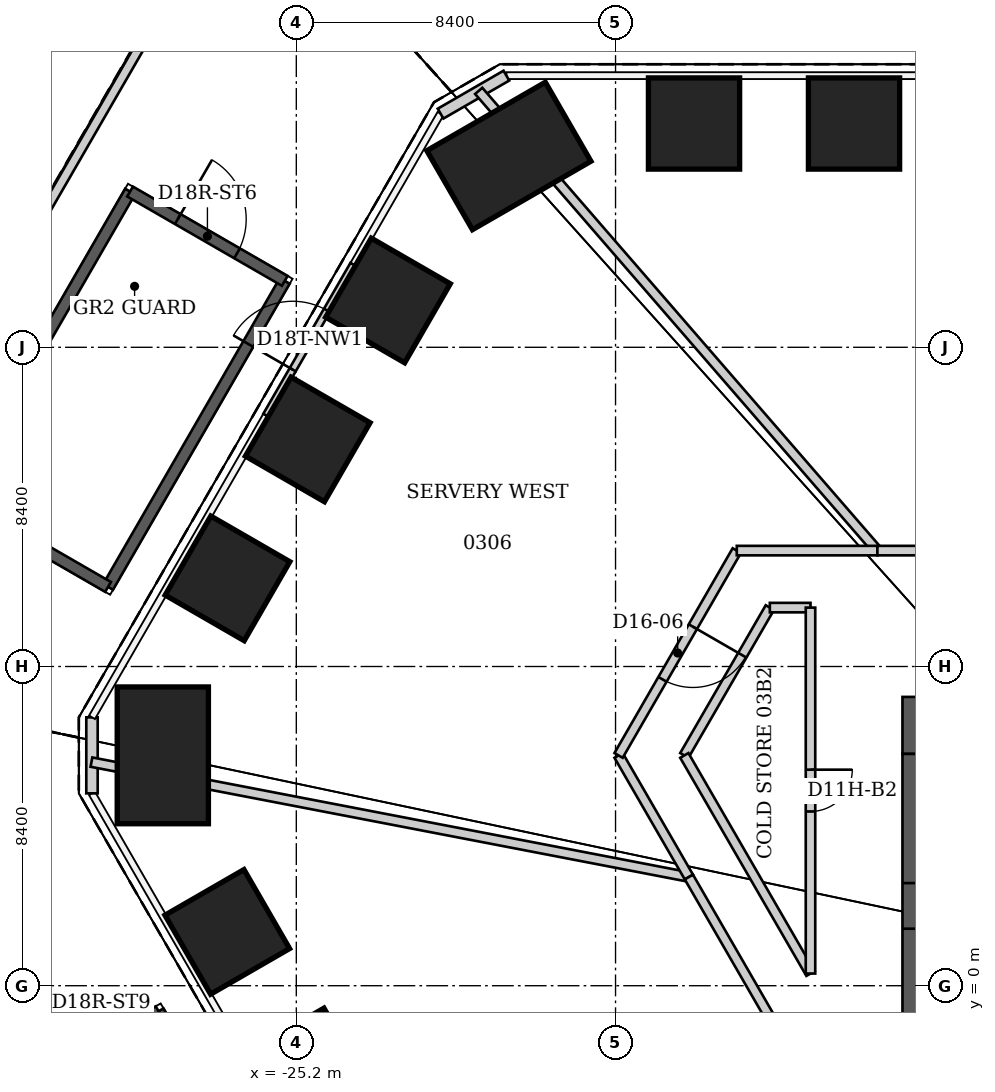
"""IFC4 building model, lengths in metres.
Left out: names, types, materials, properties, quantities, classifications, styles, units other than length and angle.
Written with IfcOpenShell. Run it as: python <this file> out.ifc"""

import sys

from ifc_helpers import new_model, si_unit, direction, frame, frame_2d, origin, origin_2d, place, context, subcontext, project, spatial, rectangle, extrude, element, fill, save


model = new_model("IFC4")
c1 = context("Model", 3, precision=1e-05, world=origin(), true_north=direction((0.0, 1.0)))
c2 = subcontext(c1, "Body", "Model", "MODEL_VIEW")
j1 = project(units=[si_unit("LENGTHUNIT", "METRE"), si_unit("PLANEANGLEUNIT", "RADIAN")], contexts=[c1])
p1 = place(None, origin())
s1 = spatial("IfcSite", under=j1, at=p1, CompositionType="ELEMENT")
p2 = place(p1, origin())
s2 = spatial("IfcBuilding", under=s1, at=p2, CompositionType="ELEMENT")
p3 = place(p2, frame((0.0, 0.0, 18.0)))
s3 = spatial("IfcBuildingStorey", under=s2, at=p3, CompositionType="ELEMENT", Elevation=18.0)
for number, where, z_axis, x_axis in (
    (1, (-14.735, 22.689, 0.0), (0.0, 0.0, 1.0), (0.0, 1.0, 0.0)),
    (2, (-10.525, 22.689, 0.0), (0.0, 0.0, 1.0), (0.0, 1.0, 0.0)),
    (3, (-24.911, -2.23, 0.0), (0.0, 0.0, 1.0), (-0.866, -0.5, 0.0)),
    (4, (-27.016, 1.416, 0.0), (0.0, 0.0, 1.0), (-0.866, -0.5, 0.0)),
):
    element("IfcColumn", number, at=place(p3, frame(where, z_axis=z_axis, x_axis=x_axis)), inside=s3, PredefinedType="COLUMN", context=c2, shape_type="SweptSolid", body=[
        extrude(rectangle(XDim=2.4, YDim=2.4, at=origin_2d()), origin(), (0.0, 0.0, 1.0), 5.0),
    ])
p4 = place(p3, frame((-28.713, 6.062, 0.0), z_axis=(0.0, 0.0, 1.0), x_axis=(-1.0, 0.0, 0.0)))
e5 = element("IfcColumn", 5, at=p4, inside=s3, PredefinedType="COLUMN", context=c2, shape_type="SweptSolid", body=[
    extrude(rectangle(XDim=2.4, YDim=3.6, at=origin_2d()), origin(), (0.0, 0.0, 1.0), 5.0),
])
for number, where, z_axis, x_axis in (
    (6, (-27.01, 10.719, 0.0), (0.0, 0.0, 1.0), (-0.866, 0.5, 0.0)),
    (7, (-24.899, 14.375, 0.0), (0.0, 0.0, 1.0), (-0.866, 0.5, 0.0)),
    (8, (-22.788, 18.032, 0.0), (0.0, 0.0, 1.0), (-0.866, 0.5, 0.0)),
):
    element("IfcColumn", number, at=place(p3, frame(where, z_axis=z_axis, x_axis=x_axis)), inside=s3, PredefinedType="COLUMN", context=c2, shape_type="SweptSolid", body=[
        extrude(rectangle(XDim=2.4, YDim=2.4, at=origin_2d()), origin(), (0.0, 0.0, 1.0), 5.0),
    ])
p5 = place(p3, frame((-19.606, 21.835, 0.0), z_axis=(0.0, 0.0, 1.0), x_axis=(-0.5, 0.866025403784, 0.0)))
e9 = element("IfcColumn", 9, at=p5, inside=s3, PredefinedType="COLUMN", context=c2, shape_type="SweptSolid", body=[
    extrude(rectangle(XDim=2.4, YDim=3.6, at=origin_2d()), origin(), (0.0, 0.0, 1.0), 5.0),
])
p6 = place(p3, frame((-9.25, 6.85, 0.0), z_axis=(0.0, 0.0, 1.0), x_axis=(1.0, 0.0, 0.0)))
e10 = element("IfcWall", 10, at=p6, inside=s3, PredefinedType="SHEAR", context=c2, shape_type="SweptSolid", body=[
    extrude(rectangle(XDim=18.5, YDim=1.5, at=frame_2d((9.25, 0.0))), origin(), (0.0, 0.0, 1.0), 5.0),
])
p7 = place(p3, frame((-8.5, -9.2, 0.0), z_axis=(0.0, 0.0, 1.0), x_axis=(0.0, 1.0, 0.0)))
e11 = element("IfcWall", 11, at=p7, inside=s3, PredefinedType="SHEAR", context=c2, shape_type="SweptSolid", body=[
    extrude(rectangle(XDim=15.3, YDim=1.5, at=frame_2d((7.65, 0.0))), origin(), (0.0, 0.0, 1.0), 5.0),
])
p8 = place(p7, frame((10.7, 0.0, 0.0)))
e12 = element("IfcOpeningElement", 12, at=p8, cuts=e11, PredefinedType="OPENING", context=c2, shape_type="SweptSolid", body=[
    extrude(rectangle(XDim=1.2, YDim=2.2, at=frame_2d((0.6, 1.1))), frame((0.0, 0.75, 0.0), z_axis=(0.0, -1.0, 0.0), x_axis=(1.0, 0.0, 0.0)), (0.0, 0.0, 1.0), 1.5),
])
p9 = place(p3, frame((-30.576, 5.062, 0.0), z_axis=(0.0, 0.0, 1.0), x_axis=(0.0, 1.0, 0.0)))
e13 = element("IfcWall", 13, at=p9, inside=s3, PredefinedType="SOLIDWALL", context=c2, shape_type="SweptSolid", body=[
    extrude(rectangle(XDim=2.0, YDim=0.3, at=frame_2d((1.0, 0.0))), origin(), (0.0, 0.0, 1.0), 4.84),
])
p10 = place(p3, frame((-25.99, 15.005, 0.0), z_axis=(0.0, 0.0, 1.0), x_axis=(0.499986657325, 0.866033107044, 0.0)))
e14 = element("IfcWall", 14, at=p10, inside=s3, PredefinedType="SOLIDWALL", context=c2, shape_type="SweptSolid", body=[
    extrude(rectangle(XDim=4.586, YDim=0.18, at=frame_2d((2.293, 0.0))), origin(), (0.0, 0.0, 1.0), 4.84),
])
p11 = place(p10, frame((1.393, 0.0, 0.0)))
e15 = element("IfcOpeningElement", 15, at=p11, cuts=e14, PredefinedType="OPENING", context=c2, shape_type="SweptSolid", body=[
    extrude(rectangle(XDim=1.8, YDim=2.4, at=frame_2d((0.9, 1.2))), frame((0.0, 0.09, 0.0), z_axis=(0.0, -1.0, 0.0), x_axis=(1.0, 0.0, 0.0)), (0.0, 0.0, 1.0), 0.18),
])
p12 = place(p3, frame((-21.404, 22.949, 0.0), z_axis=(0.0, 0.0, 1.0), x_axis=(0.866010750942, 0.50002537861, 0.0)))
e16 = element("IfcWall", 16, at=p12, inside=s3, PredefinedType="SOLIDWALL", context=c2, shape_type="SweptSolid", body=[
    extrude(rectangle(XDim=2.0, YDim=0.3, at=frame_2d((1.0, 0.0))), origin(), (0.0, 0.0, 1.0), 4.84),
])
p13 = place(p3, frame((-26.87, 28.951, -0.15), z_axis=(0.0, 0.0, 1.0), x_axis=(-0.50000302432, -0.866023657685, 0.0)))
e17 = element("IfcWall", 17, at=p13, inside=s3, PredefinedType="PARAPET", context=c2, shape_type="SweptSolid", body=[
    extrude(rectangle(XDim=23.275, YDim=0.25, at=frame_2d((11.637, 0.0))), origin(), (0.0, 0.0, 1.0), 1.25),
])
p14 = place(p3, frame((-38.505, 6.303, -0.15), z_axis=(0.0, 0.0, 1.0), x_axis=(0.500000964025, -0.866024847203, 0.0)))
e18 = element("IfcWall", 18, at=p14, inside=s3, PredefinedType="PARAPET", context=c2, shape_type="SweptSolid", body=[
    extrude(rectangle(XDim=49.423, YDim=0.25, at=frame_2d((24.712, 0.0))), origin(), (0.0, 0.0, 1.0), 1.25),
])
p15 = place(p3, frame((-30.591, 5.884, 0.0), z_axis=(0.0, 0.0, 1.0), x_axis=(0.981994806005, -0.188907916665, 0.0)))
e19 = element("IfcWall", 19, at=p15, inside=s3, PredefinedType="PARTITIONING", context=c2, shape_type="SweptSolid", body=[
    extrude(rectangle(XDim=16.009, YDim=0.25, at=frame_2d((8.004, 0.0))), origin(), (0.0, 0.0, 1.0), 4.84),
])
p16 = place(p3, frame((-16.72, 6.06, 0.0), z_axis=(0.0, 0.0, 1.0), x_axis=(0.500499855385, -0.86573661974, 0.0)))
e20 = element("IfcWall", 20, at=p16, inside=s3, PredefinedType="PARTITIONING", context=c2, shape_type="SweptSolid", body=[
    extrude(rectangle(XDim=3.697, YDim=0.25, at=frame_2d((1.848, 0.0))), origin(), (0.0, 0.0, 1.0), 4.84),
])
p17 = place(p3, frame((-14.99, 6.06, 0.0), z_axis=(0.0, 0.0, 1.0), x_axis=(0.50069571766, 0.865623358232, 0.0)))
e21 = element("IfcWall", 21, at=p17, inside=s3, PredefinedType="PARTITIONING", context=c2, shape_type="SweptSolid", body=[
    extrude(rectangle(XDim=4.494, YDim=0.25, at=frame_2d((2.247, 0.0))), origin(), (0.0, 0.0, 1.0), 4.84),
])
p18 = place(p3, frame((-14.87, 2.86, 0.0), z_axis=(0.0, 0.0, 1.0), x_axis=(0.500193675883, -0.865913556082, 0.0)))
e22 = element("IfcWall", 22, at=p18, inside=s3, PredefinedType="PARTITIONING", context=c2, shape_type="SweptSolid", body=[
    extrude(rectangle(XDim=6.398, YDim=0.25, at=frame_2d((3.199, 0.0))), origin(), (0.0, 0.0, 1.0), 4.84),
])
p19 = place(p3, frame((-13.61, 11.45, 0.0), z_axis=(0.0, 0.0, 1.0), x_axis=(-0.499759814377, -0.866164030617, 0.0)))
e23 = element("IfcWall", 23, at=p19, inside=s3, PredefinedType="PARTITIONING", context=c2, shape_type="SweptSolid", body=[
    extrude(rectangle(XDim=6.223, YDim=0.25, at=frame_2d((3.111, 0.0))), origin(), (0.0, 0.0, 1.0), 4.84),
])
p20 = place(p19, frame((2.312, 0.0, 0.0)))
e24 = element("IfcOpeningElement", 24, at=p20, cuts=e23, PredefinedType="OPENING", context=c2, shape_type="SweptSolid", body=[
    extrude(rectangle(XDim=1.6, YDim=2.4, at=frame_2d((0.8, 1.2))), frame((0.0, 0.125, 0.0), z_axis=(0.0, -1.0, 0.0), x_axis=(1.0, 0.0, 0.0)), (0.0, 0.0, 1.0), 0.25),
])
p21 = place(p3, frame((-12.74, 9.95, 0.0), z_axis=(0.0, 0.0, 1.0), x_axis=(1.0, 0.0, 0.0)))
e25 = element("IfcWall", 25, at=p21, inside=s3, PredefinedType="PARTITIONING", context=c2, shape_type="SweptSolid", body=[
    extrude(rectangle(XDim=1.07, YDim=0.25, at=frame_2d((0.535, 0.0))), origin(), (0.0, 0.0, 1.0), 4.84),
])
p22 = place(p3, frame((-11.67, 0.32, 0.0), z_axis=(0.0, 0.0, 1.0), x_axis=(-0.500687910341, 0.865627874111, 0.0)))
e26 = element("IfcWall", 26, at=p22, inside=s3, PredefinedType="PARTITIONING", context=c2, shape_type="SweptSolid", body=[
    extrude(rectangle(XDim=6.631, YDim=0.25, at=frame_2d((3.315, 0.0))), origin(), (0.0, 0.0, 1.0), 4.84),
])
p23 = place(p3, frame((-11.67, 9.95, 0.0), z_axis=(0.0, 0.0, 1.0), x_axis=(0.0, -1.0, 0.0)))
e27 = element("IfcWall", 27, at=p23, inside=s3, PredefinedType="PARTITIONING", context=c2, shape_type="SweptSolid", body=[
    extrude(rectangle(XDim=9.63, YDim=0.25, at=frame_2d((4.815, 0.0))), origin(), (0.0, 0.0, 1.0), 4.84),
])
p24 = place(p23, frame((4.265, 0.0, 0.0)))
e28 = element("IfcOpeningElement", 28, at=p24, cuts=e27, PredefinedType="OPENING", context=c2, shape_type="SweptSolid", body=[
    extrude(rectangle(XDim=1.1, YDim=2.2, at=frame_2d((0.55, 1.1))), frame((0.0, 0.125, 0.0), z_axis=(0.0, -1.0, 0.0), x_axis=(1.0, 0.0, 0.0)), (0.0, 0.0, 1.0), 0.25),
])
p25 = place(p3, frame((-9.91, 11.45, 0.0), z_axis=(0.0, 0.0, 1.0), x_axis=(-0.655146445725, 0.7555019091, 0.0)))
e29 = element("IfcWall", 29, at=p25, inside=s3, PredefinedType="PARTITIONING", context=c2, shape_type="SweptSolid", body=[
    extrude(rectangle(XDim=16.012, YDim=0.25, at=frame_2d((8.006, 0.0))), origin(), (0.0, 0.0, 1.0), 4.84),
])
p26 = place(p3, frame((-9.91, 11.45, 0.0), z_axis=(0.0, 0.0, 1.0), x_axis=(-1.0, 0.0, 0.0)))
e30 = element("IfcWall", 30, at=p26, inside=s3, PredefinedType="PARTITIONING", context=c2, shape_type="SweptSolid", body=[
    extrude(rectangle(XDim=3.7, YDim=0.25, at=frame_2d((1.85, 0.0))), origin(), (0.0, 0.0, 1.0), 4.84),
])
p27 = place(p3, frame((9.91, 11.45, 0.0), z_axis=(0.0, 0.0, 1.0), x_axis=(-1.0, 0.0, 0.0)))
e31 = element("IfcWall", 31, at=p27, inside=s3, PredefinedType="PARTITIONING", context=c2, shape_type="SweptSolid", body=[
    extrude(rectangle(XDim=19.82, YDim=0.25, at=frame_2d((9.91, 0.0))), origin(), (0.0, 0.0, 1.0), 4.84),
])
p28 = place(p27, frame((9.11, 0.0, 0.0)))
e32 = element("IfcOpeningElement", 32, at=p28, cuts=e31, PredefinedType="OPENING", context=c2, shape_type="SweptSolid", body=[
    extrude(rectangle(XDim=1.6, YDim=2.4, at=frame_2d((0.8, 1.2))), frame((0.0, 0.125, 0.0), z_axis=(0.0, -1.0, 0.0), x_axis=(1.0, 0.0, 0.0)), (0.0, 0.0, 1.0), 0.25),
])
p29 = place(p3, frame((-25.504, 18.548, 0.0), z_axis=(0.0, 0.0, 1.0), x_axis=(-0.500004225487, -0.866022964185, 0.0)))
e33 = element("IfcWall", 33, at=p29, inside=s3, PredefinedType="SHEAR", context=c2, shape_type="SweptSolid", body=[
    extrude(rectangle(XDim=9.3, YDim=0.3, at=frame_2d((4.65, 0.0))), origin(), (0.0, 0.0, 1.0), 3.2),
])
p30 = place(p3, frame((-30.154, 10.494, 0.0), z_axis=(0.0, 0.0, 1.0), x_axis=(-0.866016039709, 0.500016218704, 0.0)))
e34 = element("IfcWall", 34, at=p30, inside=s3, PredefinedType="SHEAR", context=c2, shape_type="SweptSolid", body=[
    extrude(rectangle(XDim=4.7, YDim=0.3, at=frame_2d((2.35, 0.0))), origin(), (0.0, 0.0, 1.0), 3.2),
])
p31 = place(p3, frame((-34.224, 12.844, 0.0), z_axis=(0.0, 0.0, 1.0), x_axis=(0.500015592816, 0.866016401081, 0.0)))
e35 = element("IfcWall", 35, at=p31, inside=s3, PredefinedType="SHEAR", context=c2, shape_type="SweptSolid", body=[
    extrude(rectangle(XDim=9.3, YDim=0.3, at=frame_2d((4.65, 0.0))), origin(), (0.0, 0.0, 1.0), 3.2),
])
p32 = place(p3, frame((-29.574, 20.898, 0.0), z_axis=(0.0, 0.0, 1.0), x_axis=(0.866038532462, -0.499977259774, 0.0)))
e36 = element("IfcWall", 36, at=p32, inside=s3, PredefinedType="SHEAR", context=c2, shape_type="SweptSolid", body=[
    extrude(rectangle(XDim=4.7, YDim=0.3, at=frame_2d((2.35, 0.0))), origin(), (0.0, 0.0, 1.0), 3.2),
])
p33 = place(p32, frame((1.45, 0.0, 0.0)))
e37 = element("IfcOpeningElement", 37, at=p33, cuts=e36, PredefinedType="OPENING", context=c2, shape_type="SweptSolid", body=[
    extrude(rectangle(XDim=1.8, YDim=2.1, at=frame_2d((0.9, 1.05))), frame((0.0, 0.15, 0.0), z_axis=(0.0, -1.0, 0.0), x_axis=(1.0, 0.0, 0.0)), (0.0, 0.0, 1.0), 0.3),
])
p34 = place(p3, frame((-28.824, -0.672, 0.0), z_axis=(0.0, 0.0, 1.0), x_axis=(0.499984536904, -0.866034331223, 0.0)))
e38 = element("IfcWall", 38, at=p34, inside=s3, PredefinedType="SHEAR", context=c2, shape_type="SweptSolid", body=[
    extrude(rectangle(XDim=9.3, YDim=0.3, at=frame_2d((4.65, 0.0))), origin(), (0.0, 0.0, 1.0), 3.2),
])
p35 = place(p3, frame((-31.855, -2.422, 0.0), z_axis=(0.0, 0.0, 1.0), x_axis=(0.866019471182, 0.500010275428, 0.0)))
e39 = element("IfcWall", 39, at=p35, inside=s3, PredefinedType="SHEAR", context=c2, shape_type="SweptSolid", body=[
    extrude(rectangle(XDim=3.5, YDim=0.3, at=frame_2d((1.75, 0.0))), origin(), (0.0, 0.0, 1.0), 3.2),
])
p36 = place(p35, frame((0.85, 0.0, 0.0)))
e40 = element("IfcOpeningElement", 40, at=p36, cuts=e39, PredefinedType="OPENING", context=c2, shape_type="SweptSolid", body=[
    extrude(rectangle(XDim=1.8, YDim=2.1, at=frame_2d((0.9, 1.05))), frame((0.0, 0.15, 0.0), z_axis=(0.0, -1.0, 0.0), x_axis=(1.0, 0.0, 0.0)), (0.0, 0.0, 1.0), 0.3),
])
p37 = place(p11, origin())
e41 = element("IfcDoor", 41, at=p37, inside=s3, OperationType="SINGLE_SWING_LEFT", PredefinedType="DOOR", context=c2, shape_type="SweptSolid", body=[
    extrude(rectangle(XDim=1.8, YDim=2.4, at=frame_2d((0.9, 1.2))), frame((0.0, 0.025, 0.0), z_axis=(0.0, -1.0, 0.0), x_axis=(1.0, 0.0, 0.0)), (0.0, 0.0, 1.0), 0.05),
])
fill(e15, e41)
p38 = place(p20, origin())
e42 = element("IfcDoor", 42, at=p38, inside=s3, OperationType="DOUBLE_DOOR_SINGLE_SWING", PredefinedType="DOOR", context=c2, shape_type="SweptSolid", body=[
    extrude(rectangle(XDim=1.6, YDim=2.4, at=frame_2d((0.8, 1.2))), frame((0.0, 0.025, 0.0), z_axis=(0.0, -1.0, 0.0), x_axis=(1.0, 0.0, 0.0)), (0.0, 0.0, 1.0), 0.05),
])
fill(e24, e42)
p39 = place(p24, origin())
e43 = element("IfcDoor", 43, at=p39, inside=s3, OperationType="SINGLE_SWING_LEFT", PredefinedType="DOOR", context=c2, shape_type="SweptSolid", body=[
    extrude(rectangle(XDim=1.1, YDim=2.2, at=frame_2d((0.55, 1.1))), frame((0.0, 0.025, 0.0), z_axis=(0.0, -1.0, 0.0), x_axis=(1.0, 0.0, 0.0)), (0.0, 0.0, 1.0), 0.05),
])
fill(e28, e43)
p40 = place(p33, origin())
e44 = element("IfcDoor", 44, at=p40, inside=s3, OperationType="DOUBLE_DOOR_SINGLE_SWING", PredefinedType="DOOR", context=c2, shape_type="SweptSolid", body=[
    extrude(rectangle(XDim=1.8, YDim=2.1, at=frame_2d((0.9, 1.05))), frame((0.0, 0.025, 0.0), z_axis=(0.0, -1.0, 0.0), x_axis=(1.0, 0.0, 0.0)), (0.0, 0.0, 1.0), 0.05),
])
fill(e37, e44)
save(model, sys.argv[1])
